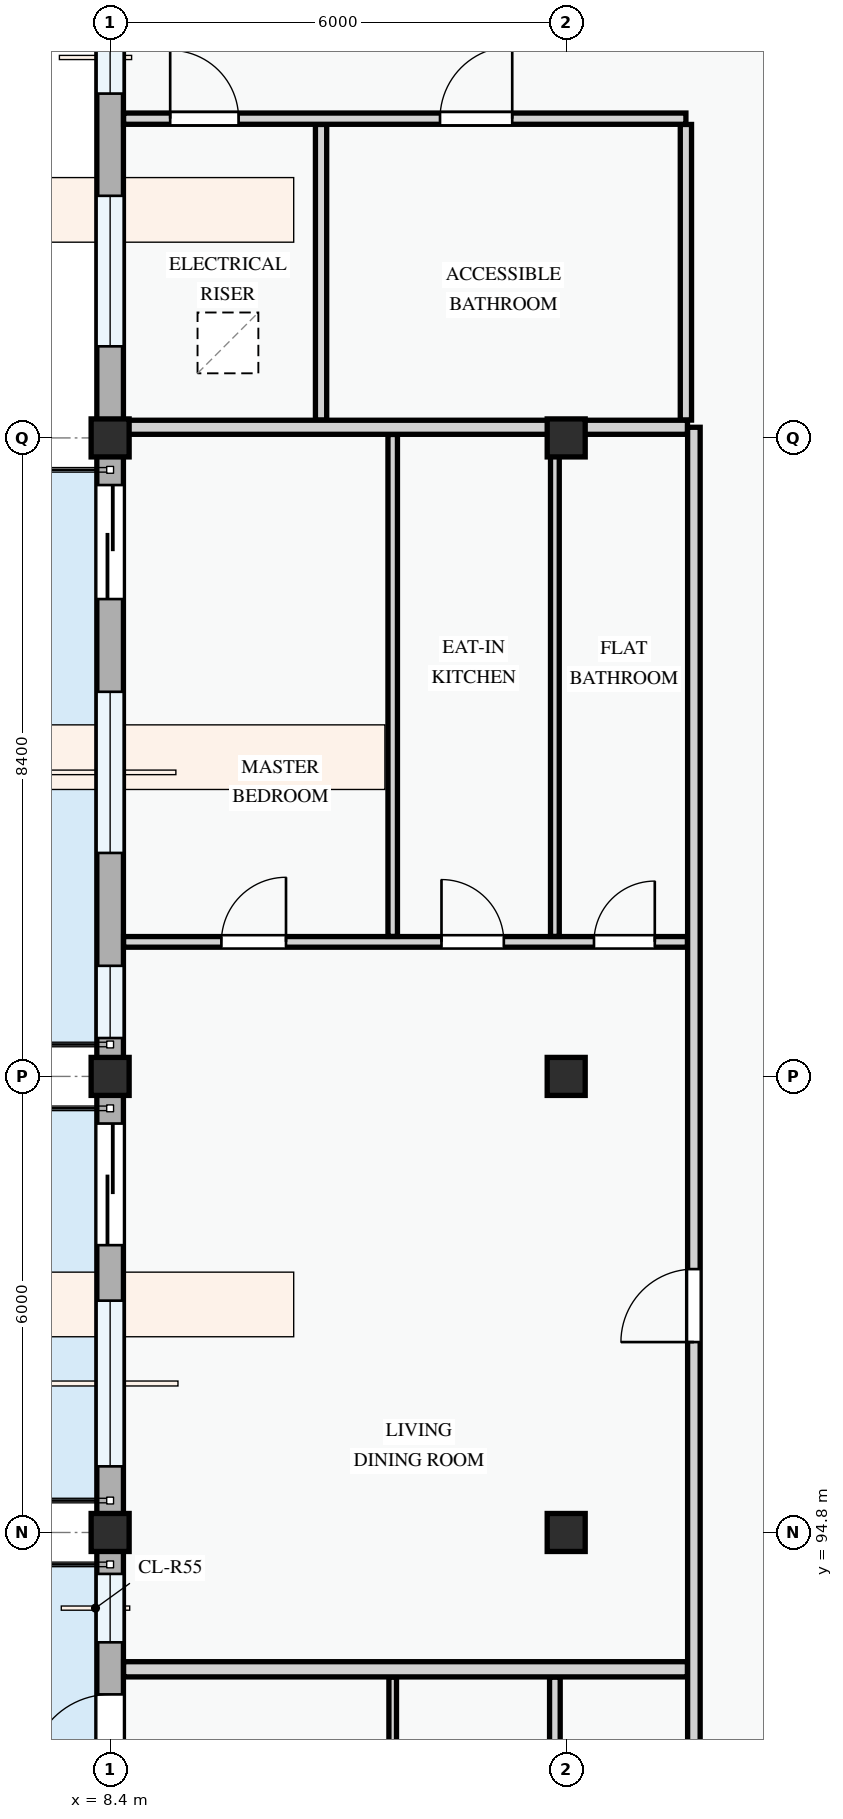
"""IFC4 building model, lengths in metres.
Left out: names, types, materials, properties, quantities, classifications, styles, units other than length and angle.
Written with IfcOpenShell. Run it as: python <this file> out.ifc"""

import sys

from ifc_helpers import new_model, si_unit, direction, frame, frame_2d, origin, origin_2d, place, context, subcontext, project, spatial, rectangle, extrude, element, fill, save


model = new_model("IFC4")
c1 = context("Model", 3, precision=1e-05, world=origin(), true_north=direction((0.0, 1.0)))
c2 = subcontext(c1, "Body", "Model", "MODEL_VIEW")
j1 = project(units=[si_unit("LENGTHUNIT", "METRE"), si_unit("PLANEANGLEUNIT", "RADIAN")], contexts=[c1])
p1 = place(None, origin())
s1 = spatial("IfcSite", under=j1, at=p1, CompositionType="ELEMENT")
p2 = place(p1, origin())
s2 = spatial("IfcBuilding", under=s1, at=p2, CompositionType="ELEMENT")
p3 = place(p2, frame((0.0, 0.0, 47.7)))
s3 = spatial("IfcBuildingStorey", under=s2, at=p3, CompositionType="ELEMENT", Elevation=47.7)
for number, where, z_axis, x_axis in (
    (1, (8.4, 94.8, 0.0), (0.0, 0.0, 1.0), (1.0, 0.0, 0.0)),
    (2, (8.4, 100.8, 0.0), (0.0, 0.0, 1.0), (1.0, 0.0, 0.0)),
    (3, (8.4, 109.2, 0.0), (0.0, 0.0, 1.0), (1.0, 0.0, 0.0)),
    (4, (14.4, 94.8, 0.0), (0.0, 0.0, 1.0), (1.0, 0.0, 0.0)),
    (5, (14.4, 100.8, 0.0), (0.0, 0.0, 1.0), (1.0, 0.0, 0.0)),
    (6, (14.4, 109.2, 0.0), (0.0, 0.0, 1.0), (1.0, 0.0, 0.0)),
):
    element("IfcColumn", number, at=place(p3, frame(where, z_axis=z_axis, x_axis=x_axis)), inside=s3, PredefinedType="COLUMN", context=c2, shape_type="SweptSolid", body=[
        extrude(rectangle(XDim=0.5, YDim=0.5, at=origin_2d()), origin(), (0.0, 0.0, 1.0), 3.3),
    ])
p4 = place(p3, frame((8.4, 115.2, 0.0), z_axis=(0.0, 0.0, 1.0), x_axis=(0.0, -1.0, 0.0)))
e7 = element("IfcWall", 7, at=p4, inside=s3, PredefinedType="STANDARD", context=c2, shape_type="SweptSolid", body=[
    extrude(rectangle(XDim=6.0, YDim=0.35, at=frame_2d((3.0, 0.0))), origin(), (0.0, 0.0, 1.0), 2.575),
])
p5 = place(p4, frame((0.52, 0.0, 0.78)))
e8 = element("IfcOpeningElement", 8, at=p5, cuts=e7, PredefinedType="OPENING", context=c2, shape_type="SweptSolid", body=[
    extrude(rectangle(XDim=0.95, YDim=1.15, at=frame_2d((0.475, 0.575))), frame((0.0, 0.185, 0.0), z_axis=(0.0, -1.0, 0.0), x_axis=(1.0, 0.0, 0.0)), (0.0, 0.0, 1.0), 0.37),
])
p6 = place(p4, frame((2.815, 0.0, 0.78)))
e9 = element("IfcOpeningElement", 9, at=p6, cuts=e7, PredefinedType="OPENING", context=c2, shape_type="SweptSolid", body=[
    extrude(rectangle(XDim=1.98, YDim=1.5, at=frame_2d((0.99, 0.75))), frame((0.0, 0.185, 0.0), z_axis=(0.0, -1.0, 0.0), x_axis=(1.0, 0.0, 0.0)), (0.0, 0.0, 1.0), 0.37),
])
p7 = place(p3, frame((8.4, 109.2, 0.0), z_axis=(0.0, 0.0, 1.0), x_axis=(0.0, -1.0, 0.0)))
e10 = element("IfcWall", 10, at=p7, inside=s3, PredefinedType="STANDARD", context=c2, shape_type="SweptSolid", body=[
    extrude(rectangle(XDim=8.4, YDim=0.35, at=frame_2d((4.2, 0.0))), origin(), (0.0, 0.0, 1.0), 2.425),
])
p8 = place(p7, frame((0.62, 0.0, 0.0)))
e11 = element("IfcOpeningElement", 11, at=p8, cuts=e10, PredefinedType="OPENING", context=c2, shape_type="SweptSolid", body=[
    extrude(rectangle(XDim=1.5, YDim=2.2, at=frame_2d((0.75, 1.1))), frame((0.0, 0.185, 0.0), z_axis=(0.0, -1.0, 0.0), x_axis=(1.0, 0.0, 0.0)), (0.0, 0.0, 1.0), 0.37),
])
p9 = place(p7, frame((3.34, 0.0, 0.78)))
e12 = element("IfcOpeningElement", 12, at=p9, cuts=e10, PredefinedType="OPENING", context=c2, shape_type="SweptSolid", body=[
    extrude(rectangle(XDim=2.12, YDim=1.44, at=frame_2d((1.06, 0.72))), frame((0.0, 0.185, 0.0), z_axis=(0.0, -1.0, 0.0), x_axis=(1.0, 0.0, 0.0)), (0.0, 0.0, 1.0), 0.37),
])
p10 = place(p7, frame((6.945, 0.0, 0.78)))
e13 = element("IfcOpeningElement", 13, at=p10, cuts=e10, PredefinedType="OPENING", context=c2, shape_type="SweptSolid", body=[
    extrude(rectangle(XDim=0.95, YDim=1.15, at=frame_2d((0.475, 0.575))), frame((0.0, 0.185, 0.0), z_axis=(0.0, -1.0, 0.0), x_axis=(1.0, 0.0, 0.0)), (0.0, 0.0, 1.0), 0.37),
])
p11 = place(p3, frame((8.4, 100.8, 0.0), z_axis=(0.0, 0.0, 1.0), x_axis=(0.0, -1.0, 0.0)))
e14 = element("IfcWall", 14, at=p11, inside=s3, PredefinedType="STANDARD", context=c2, shape_type="SweptSolid", body=[
    extrude(rectangle(XDim=6.0, YDim=0.35, at=frame_2d((3.0, 0.0))), origin(), (0.0, 0.0, 1.0), 2.575),
])
p12 = place(p11, frame((0.62, 0.0, 0.0)))
e15 = element("IfcOpeningElement", 15, at=p12, cuts=e14, PredefinedType="OPENING", context=c2, shape_type="SweptSolid", body=[
    extrude(rectangle(XDim=1.6, YDim=2.2, at=frame_2d((0.8, 1.1))), frame((0.0, 0.185, 0.0), z_axis=(0.0, -1.0, 0.0), x_axis=(1.0, 0.0, 0.0)), (0.0, 0.0, 1.0), 0.37),
])
p13 = place(p11, frame((2.95, 0.0, 0.78)))
e16 = element("IfcOpeningElement", 16, at=p13, cuts=e14, PredefinedType="OPENING", context=c2, shape_type="SweptSolid", body=[
    extrude(rectangle(XDim=2.18, YDim=1.48, at=frame_2d((1.09, 0.74))), frame((0.0, 0.185, 0.0), z_axis=(0.0, -1.0, 0.0), x_axis=(1.0, 0.0, 0.0)), (0.0, 0.0, 1.0), 0.37),
])
p14 = place(p3, frame((8.4, 94.8, 0.0), z_axis=(0.0, 0.0, 1.0), x_axis=(0.0, -1.0, 0.0)))
e17 = element("IfcWall", 17, at=p14, inside=s3, PredefinedType="STANDARD", context=c2, shape_type="SweptSolid", body=[
    extrude(rectangle(XDim=8.4, YDim=0.35, at=frame_2d((4.2, 0.0))), origin(), (0.0, 0.0, 1.0), 2.425),
])
p15 = place(p14, frame((2.13, 0.0, 0.0)))
e18 = element("IfcOpeningElement", 18, at=p15, cuts=e17, PredefinedType="OPENING", context=c2, shape_type="SweptSolid", body=[
    extrude(rectangle(XDim=1.05, YDim=2.15, at=frame_2d((0.525, 1.075))), frame((0.0, 0.185, 0.0), z_axis=(0.0, -1.0, 0.0), x_axis=(1.0, 0.0, 0.0)), (0.0, 0.0, 1.0), 0.37),
])
p16 = place(p14, frame((0.545, 0.0, 0.78)))
e19 = element("IfcOpeningElement", 19, at=p16, cuts=e17, PredefinedType="OPENING", context=c2, shape_type="SweptSolid", body=[
    extrude(rectangle(XDim=0.9, YDim=1.2, at=frame_2d((0.45, 0.6))), frame((0.0, 0.185, 0.0), z_axis=(0.0, -1.0, 0.0), x_axis=(1.0, 0.0, 0.0)), (0.0, 0.0, 1.0), 0.37),
])
p17 = place(p14, frame((3.6, 0.0, 0.78)))
e20 = element("IfcOpeningElement", 20, at=p17, cuts=e17, PredefinedType="OPENING", context=c2, shape_type="SweptSolid", body=[
    extrude(rectangle(XDim=1.1, YDim=1.3, at=frame_2d((0.55, 0.65))), frame((0.0, 0.185, 0.0), z_axis=(0.0, -1.0, 0.0), x_axis=(1.0, 0.0, 0.0)), (0.0, 0.0, 1.0), 0.37),
])
p18 = place(p14, frame((5.94, 0.0, 0.78)))
e21 = element("IfcOpeningElement", 21, at=p18, cuts=e17, PredefinedType="OPENING", context=c2, shape_type="SweptSolid", body=[
    extrude(rectangle(XDim=1.4, YDim=1.45, at=frame_2d((0.7, 0.725))), frame((0.0, 0.185, 0.0), z_axis=(0.0, -1.0, 0.0), x_axis=(1.0, 0.0, 0.0)), (0.0, 0.0, 1.0), 0.37),
])
for number, where, z_axis, x_axis in (
    (22, (11.175, 113.324, 0.0), (0.0, 0.0, 1.0), (0.0, -1.0, 0.0)),
    (23, (15.975, 113.324, 0.0), (0.0, 0.0, 1.0), (0.0, -1.0, 0.0)),
):
    element("IfcWall", number, at=place(p3, frame(where, z_axis=z_axis, x_axis=x_axis)), inside=s3, PredefinedType="PARTITIONING", context=c2, shape_type="SweptSolid", body=[
        extrude(rectangle(XDim=3.889, YDim=0.148, at=frame_2d((1.945, 0.0))), origin(), (0.0, 0.0, 1.0), 3.0),
    ])
p19 = place(p3, frame((8.577, 113.4, 0.0), z_axis=(0.0, 0.0, 1.0), x_axis=(1.0, 0.0, 0.0)))
e24 = element("IfcWall", 24, at=p19, inside=s3, PredefinedType="PARTITIONING", context=c2, shape_type="SweptSolid", body=[
    extrude(rectangle(XDim=7.398, YDim=0.148, at=frame_2d((3.699, 0.0))), origin(), (0.0, 0.0, 1.0), 3.0),
])
p20 = place(p19, frame((0.613, 0.0, 0.0)))
e25 = element("IfcOpeningElement", 25, at=p20, cuts=e24, PredefinedType="OPENING", context=c2, shape_type="SweptSolid", body=[
    extrude(rectangle(XDim=0.9, YDim=2.1, at=frame_2d((0.45, 1.05))), frame((0.0, 0.084, 0.0), z_axis=(0.0, -1.0, 0.0), x_axis=(1.0, 0.0, 0.0)), (0.0, 0.0, 1.0), 0.168),
])
p21 = place(p19, frame((4.163, 0.0, 0.0)))
e26 = element("IfcOpeningElement", 26, at=p21, cuts=e24, PredefinedType="OPENING", context=c2, shape_type="SweptSolid", body=[
    extrude(rectangle(XDim=0.95, YDim=2.1, at=frame_2d((0.475, 1.05))), frame((0.0, 0.084, 0.0), z_axis=(0.0, -1.0, 0.0), x_axis=(1.0, 0.0, 0.0)), (0.0, 0.0, 1.0), 0.168),
])
p22 = place(p3, frame((12.118, 89.79, 0.0), z_axis=(0.0, 0.0, 1.0), x_axis=(0.0, 1.0, 0.0)))
e27 = element("IfcWall", 27, at=p22, inside=s3, PredefinedType="PARTITIONING", context=c2, shape_type="SweptSolid", body=[
    extrude(rectangle(XDim=3.108, YDim=0.1, at=frame_2d((1.554, 0.0))), origin(), (0.0, 0.0, 1.0), 3.0),
])
p23 = place(p3, frame((14.251, 89.79, 0.0), z_axis=(0.0, 0.0, 1.0), x_axis=(0.0, 1.0, 0.0)))
e28 = element("IfcWall", 28, at=p23, inside=s3, PredefinedType="PARTITIONING", context=c2, shape_type="SweptSolid", body=[
    extrude(rectangle(XDim=3.108, YDim=0.14, at=frame_2d((1.554, 0.0))), origin(), (0.0, 0.0, 1.0), 2.425),
])
p24 = place(p3, frame((8.577, 102.57, 0.0), z_axis=(0.0, 0.0, 1.0), x_axis=(1.0, 0.0, 0.0)))
e29 = element("IfcWall", 29, at=p24, inside=s3, PredefinedType="PARTITIONING", context=c2, shape_type="SweptSolid", body=[
    extrude(rectangle(XDim=7.419, YDim=0.14, at=frame_2d((3.709, 0.0))), origin(), (0.0, 0.0, 1.0), 3.0),
])
p25 = place(p24, frame((1.287, 0.0, 0.0)))
e30 = element("IfcOpeningElement", 30, at=p25, cuts=e29, PredefinedType="OPENING", context=c2, shape_type="SweptSolid", body=[
    extrude(rectangle(XDim=0.85, YDim=2.1, at=frame_2d((0.425, 1.05))), frame((0.0, 0.08, 0.0), z_axis=(0.0, -1.0, 0.0), x_axis=(1.0, 0.0, 0.0)), (0.0, 0.0, 1.0), 0.16),
])
p26 = place(p24, frame((4.182, 0.0, 0.0)))
e31 = element("IfcOpeningElement", 31, at=p26, cuts=e29, PredefinedType="OPENING", context=c2, shape_type="SweptSolid", body=[
    extrude(rectangle(XDim=0.82, YDim=2.08, at=frame_2d((0.41, 1.04))), frame((0.0, 0.08, 0.0), z_axis=(0.0, -1.0, 0.0), x_axis=(1.0, 0.0, 0.0)), (0.0, 0.0, 1.0), 0.16),
])
p27 = place(p24, frame((6.189, 0.0, 0.0)))
e32 = element("IfcOpeningElement", 32, at=p27, cuts=e29, PredefinedType="OPENING", context=c2, shape_type="SweptSolid", body=[
    extrude(rectangle(XDim=0.8, YDim=2.1, at=frame_2d((0.4, 1.05))), frame((0.0, 0.08, 0.0), z_axis=(0.0, -1.0, 0.0), x_axis=(1.0, 0.0, 0.0)), (0.0, 0.0, 1.0), 0.16),
])
p28 = place(p3, frame((12.118, 102.642, 0.0), z_axis=(0.0, 0.0, 1.0), x_axis=(0.0, 1.0, 0.0)))
e33 = element("IfcWall", 33, at=p28, inside=s3, PredefinedType="PARTITIONING", context=c2, shape_type="SweptSolid", body=[
    extrude(rectangle(XDim=6.604, YDim=0.125, at=frame_2d((3.302, 0.0))), origin(), (0.0, 0.0, 1.0), 3.0),
])
p29 = place(p3, frame((14.251, 102.642, 0.0), z_axis=(0.0, 0.0, 1.0), x_axis=(0.0, 1.0, 0.0)))
e34 = element("IfcWall", 34, at=p29, inside=s3, PredefinedType="PARTITIONING", context=c2, shape_type="SweptSolid", body=[
    extrude(rectangle(XDim=6.604, YDim=0.115, at=frame_2d((3.302, 0.0))), origin(), (0.0, 0.0, 1.0), 2.425),
])
p30 = place(p3, frame((8.577, 93.0, 0.0), z_axis=(0.0, 0.0, 1.0), x_axis=(1.0, 0.0, 0.0)))
e35 = element("IfcWall", 35, at=p30, inside=s3, PredefinedType="PARTITIONING", context=c2, shape_type="SweptSolid", body=[
    extrude(rectangle(XDim=7.419, YDim=0.2, at=frame_2d((3.709, 0.0))), origin(), (0.0, 0.0, 1.0), 3.0),
])
p31 = place(p3, frame((8.577, 109.34, 0.0), z_axis=(0.0, 0.0, 1.0), x_axis=(1.0, 0.0, 0.0)))
e36 = element("IfcWall", 36, at=p31, inside=s3, PredefinedType="PARTITIONING", context=c2, shape_type="SweptSolid", body=[
    extrude(rectangle(XDim=7.419, YDim=0.185, at=frame_2d((3.709, 0.0))), origin(), (0.0, 0.0, 1.0), 2.375),
])
p32 = place(p3, frame((16.08, 86.577, 0.0), z_axis=(0.0, 0.0, 1.0), x_axis=(0.0, 1.0, 0.0)))
e37 = element("IfcWall", 37, at=p32, inside=s3, PredefinedType="PARTITIONING", context=c2, shape_type="SweptSolid", body=[
    extrude(rectangle(XDim=22.763, YDim=0.165, at=frame_2d((11.382, 0.0))), origin(), (0.0, 0.0, 1.0), 3.0),
])
p33 = place(p32, frame((1.943, 0.0, 0.0)))
e38 = element("IfcOpeningElement", 38, at=p33, cuts=e37, PredefinedType="OPENING", context=c2, shape_type="SweptSolid", body=[
    extrude(rectangle(XDim=0.92, YDim=2.1, at=frame_2d((0.46, 1.05))), frame((0.0, 0.093, 0.0), z_axis=(0.0, -1.0, 0.0), x_axis=(1.0, 0.0, 0.0)), (0.0, 0.0, 1.0), 0.185),
])
p34 = place(p32, frame((10.728, 0.0, 0.0)))
e39 = element("IfcOpeningElement", 39, at=p34, cuts=e37, PredefinedType="OPENING", context=c2, shape_type="SweptSolid", body=[
    extrude(rectangle(XDim=0.96, YDim=2.12, at=frame_2d((0.48, 1.06))), frame((0.0, 0.093, 0.0), z_axis=(0.0, -1.0, 0.0), x_axis=(1.0, 0.0, 0.0)), (0.0, 0.0, 1.0), 0.185),
])
p35 = place(p5, origin())
e40 = element("IfcWindow", 40, at=p35, inside=s3, PartitioningType="SINGLE_PANEL", PredefinedType="WINDOW", context=c2, shape_type="SweptSolid", body=[
    extrude(rectangle(XDim=0.95, YDim=1.15, at=frame_2d((0.475, 0.575))), frame((0.0, 0.03, 0.0), z_axis=(0.0, -1.0, 0.0), x_axis=(1.0, 0.0, 0.0)), (0.0, 0.0, 1.0), 0.06),
])
fill(e8, e40)
p36 = place(p6, origin())
e41 = element("IfcWindow", 41, at=p36, inside=s3, PartitioningType="DOUBLE_PANEL_VERTICAL", PredefinedType="WINDOW", context=c2, shape_type="SweptSolid", body=[
    extrude(rectangle(XDim=1.98, YDim=1.5, at=frame_2d((0.99, 0.75))), frame((0.0, 0.03, 0.0), z_axis=(0.0, -1.0, 0.0), x_axis=(1.0, 0.0, 0.0)), (0.0, 0.0, 1.0), 0.06),
])
fill(e9, e41)
p37 = place(p8, frame((1.5, 0.0, 0.0), z_axis=(0.0, 0.0, 1.0), x_axis=(-1.0, 0.0, 0.0)))
e42 = element("IfcDoor", 42, at=p37, inside=s3, OperationType="SLIDING_TO_RIGHT", PredefinedType="DOOR", context=c2, shape_type="SweptSolid", body=[
    extrude(rectangle(XDim=1.5, YDim=2.2, at=frame_2d((0.75, 1.1))), frame((0.0, 0.025, 0.0), z_axis=(0.0, -1.0, 0.0), x_axis=(1.0, 0.0, 0.0)), (0.0, 0.0, 1.0), 0.05),
])
fill(e11, e42)
p38 = place(p9, origin())
e43 = element("IfcWindow", 43, at=p38, inside=s3, PartitioningType="DOUBLE_PANEL_VERTICAL", PredefinedType="WINDOW", context=c2, shape_type="SweptSolid", body=[
    extrude(rectangle(XDim=2.12, YDim=1.44, at=frame_2d((1.06, 0.72))), frame((0.0, 0.03, 0.0), z_axis=(0.0, -1.0, 0.0), x_axis=(1.0, 0.0, 0.0)), (0.0, 0.0, 1.0), 0.06),
])
fill(e12, e43)
p39 = place(p10, origin())
e44 = element("IfcWindow", 44, at=p39, inside=s3, PartitioningType="SINGLE_PANEL", PredefinedType="WINDOW", context=c2, shape_type="SweptSolid", body=[
    extrude(rectangle(XDim=0.95, YDim=1.15, at=frame_2d((0.475, 0.575))), frame((0.0, 0.03, 0.0), z_axis=(0.0, -1.0, 0.0), x_axis=(1.0, 0.0, 0.0)), (0.0, 0.0, 1.0), 0.06),
])
fill(e13, e44)
p40 = place(p12, frame((1.6, 0.0, 0.0), z_axis=(0.0, 0.0, 1.0), x_axis=(-1.0, 0.0, 0.0)))
e45 = element("IfcDoor", 45, at=p40, inside=s3, OperationType="SLIDING_TO_LEFT", PredefinedType="DOOR", context=c2, shape_type="SweptSolid", body=[
    extrude(rectangle(XDim=1.6, YDim=2.2, at=frame_2d((0.8, 1.1))), frame((0.0, 0.025, 0.0), z_axis=(0.0, -1.0, 0.0), x_axis=(1.0, 0.0, 0.0)), (0.0, 0.0, 1.0), 0.05),
])
fill(e15, e45)
p41 = place(p13, origin())
e46 = element("IfcWindow", 46, at=p41, inside=s3, PartitioningType="DOUBLE_PANEL_VERTICAL", PredefinedType="WINDOW", context=c2, shape_type="SweptSolid", body=[
    extrude(rectangle(XDim=2.18, YDim=1.48, at=frame_2d((1.09, 0.74))), frame((0.0, 0.03, 0.0), z_axis=(0.0, -1.0, 0.0), x_axis=(1.0, 0.0, 0.0)), (0.0, 0.0, 1.0), 0.06),
])
fill(e16, e46)
p42 = place(p15, frame((1.05, 0.0, 0.0), z_axis=(0.0, 0.0, 1.0), x_axis=(-1.0, 0.0, 0.0)))
e47 = element("IfcDoor", 47, at=p42, inside=s3, OperationType="SINGLE_SWING_LEFT", PredefinedType="DOOR", context=c2, shape_type="SweptSolid", body=[
    extrude(rectangle(XDim=1.05, YDim=2.15, at=frame_2d((0.525, 1.075))), frame((0.0, 0.025, 0.0), z_axis=(0.0, -1.0, 0.0), x_axis=(1.0, 0.0, 0.0)), (0.0, 0.0, 1.0), 0.05),
])
fill(e18, e47)
p43 = place(p16, origin())
e48 = element("IfcWindow", 48, at=p43, inside=s3, PartitioningType="SINGLE_PANEL", PredefinedType="WINDOW", context=c2, shape_type="SweptSolid", body=[
    extrude(rectangle(XDim=0.9, YDim=1.2, at=frame_2d((0.45, 0.6))), frame((0.0, 0.03, 0.0), z_axis=(0.0, -1.0, 0.0), x_axis=(1.0, 0.0, 0.0)), (0.0, 0.0, 1.0), 0.06),
])
fill(e19, e48)
p44 = place(p20, origin())
e49 = element("IfcDoor", 49, at=p44, inside=s3, OperationType="SINGLE_SWING_LEFT", PredefinedType="DOOR", context=c2, shape_type="SweptSolid", body=[
    extrude(rectangle(XDim=0.9, YDim=2.1, at=frame_2d((0.45, 1.05))), frame((0.0, 0.025, 0.0), z_axis=(0.0, -1.0, 0.0), x_axis=(1.0, 0.0, 0.0)), (0.0, 0.0, 1.0), 0.05),
])
fill(e25, e49)
p45 = place(p21, origin())
e50 = element("IfcDoor", 50, at=p45, inside=s3, OperationType="SINGLE_SWING_RIGHT", PredefinedType="DOOR", context=c2, shape_type="SweptSolid", body=[
    extrude(rectangle(XDim=0.95, YDim=2.1, at=frame_2d((0.475, 1.05))), frame((0.0, 0.025, 0.0), z_axis=(0.0, -1.0, 0.0), x_axis=(1.0, 0.0, 0.0)), (0.0, 0.0, 1.0), 0.05),
])
fill(e26, e50)
p46 = place(p25, origin())
e51 = element("IfcDoor", 51, at=p46, inside=s3, OperationType="SINGLE_SWING_RIGHT", PredefinedType="DOOR", context=c2, shape_type="SweptSolid", body=[
    extrude(rectangle(XDim=0.85, YDim=2.1, at=frame_2d((0.425, 1.05))), frame((0.0, 0.025, 0.0), z_axis=(0.0, -1.0, 0.0), x_axis=(1.0, 0.0, 0.0)), (0.0, 0.0, 1.0), 0.05),
])
fill(e30, e51)
p47 = place(p26, origin())
e52 = element("IfcDoor", 52, at=p47, inside=s3, OperationType="SINGLE_SWING_LEFT", PredefinedType="DOOR", context=c2, shape_type="SweptSolid", body=[
    extrude(rectangle(XDim=0.82, YDim=2.08, at=frame_2d((0.41, 1.04))), frame((0.0, 0.025, 0.0), z_axis=(0.0, -1.0, 0.0), x_axis=(1.0, 0.0, 0.0)), (0.0, 0.0, 1.0), 0.05),
])
fill(e31, e52)
p48 = place(p27, origin())
e53 = element("IfcDoor", 53, at=p48, inside=s3, OperationType="SINGLE_SWING_RIGHT", PredefinedType="DOOR", context=c2, shape_type="SweptSolid", body=[
    extrude(rectangle(XDim=0.8, YDim=2.1, at=frame_2d((0.4, 1.05))), frame((0.0, 0.025, 0.0), z_axis=(0.0, -1.0, 0.0), x_axis=(1.0, 0.0, 0.0)), (0.0, 0.0, 1.0), 0.05),
])
fill(e32, e53)
p49 = place(p34, origin())
e54 = element("IfcDoor", 54, at=p49, inside=s3, OperationType="SINGLE_SWING_LEFT", PredefinedType="DOOR", context=c2, shape_type="SweptSolid", body=[
    extrude(rectangle(XDim=0.96, YDim=2.12, at=frame_2d((0.48, 1.06))), frame((0.0, 0.025, 0.0), z_axis=(0.0, -1.0, 0.0), x_axis=(1.0, 0.0, 0.0)), (0.0, 0.0, 1.0), 0.05),
])
fill(e39, e54)
save(model, sys.argv[1])
